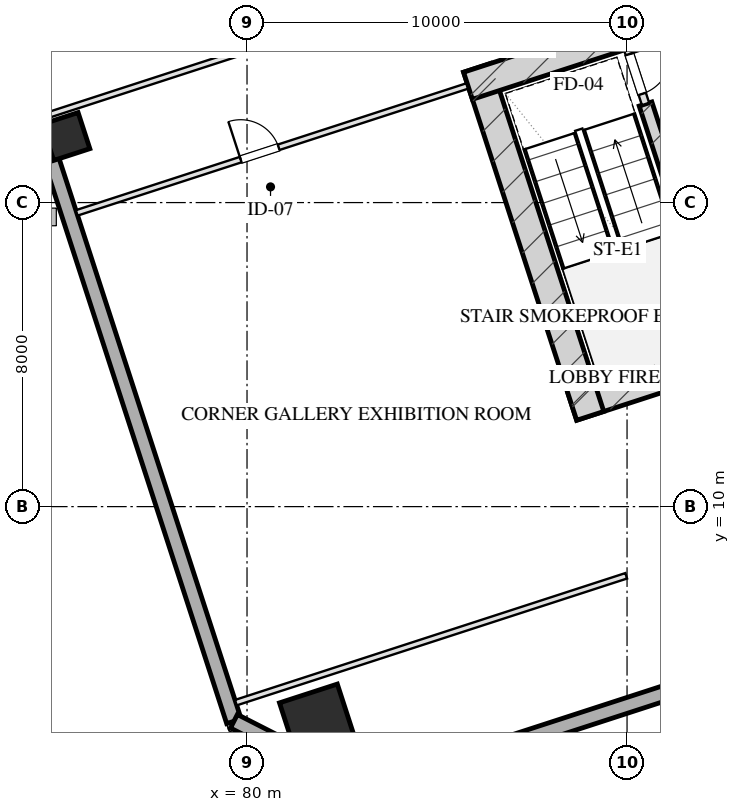
"""IFC4 building model, lengths in metres.
Left out: names, types, materials, properties, quantities, classifications, styles, units other than length and angle.
Written with IfcOpenShell. Run it as: python <this file> out.ifc"""

import sys

from ifc_helpers import new_model, si_unit, direction, frame, frame_2d, origin, origin_2d, place, context, subcontext, project, spatial, rectangle, hollow_rectangle, extrude, element, fill, save


model = new_model("IFC4")
c1 = context("Model", 3, precision=1e-05, world=origin(), true_north=direction((0.0, 1.0)))
c2 = subcontext(c1, "Body", "Model", "MODEL_VIEW")
j1 = project(units=[si_unit("LENGTHUNIT", "METRE"), si_unit("PLANEANGLEUNIT", "RADIAN")], contexts=[c1])
p1 = place(None, origin())
s1 = spatial("IfcSite", under=j1, at=p1, CompositionType="ELEMENT")
p2 = place(p1, origin())
s2 = spatial("IfcBuilding", under=s1, at=p2, CompositionType="ELEMENT")
p3 = place(p2, frame((0.0, 0.0, 34.0)))
s3 = spatial("IfcBuildingStorey", under=s2, at=p3, CompositionType="ELEMENT", Elevation=34.0)
p4 = place(p3, frame((88.559, 12.629, 0.0), z_axis=(0.0, 0.0, 1.0), x_axis=(0.951056072937, 0.309018358888, 0.0)))
e1 = element("IfcWall", 1, at=p4, inside=s3, PredefinedType="SHEAR", context=c2, shape_type="SweptSolid", body=[
    extrude(rectangle(XDim=16.55, YDim=0.75, at=frame_2d((8.275, 0.0))), origin(), (0.0, 0.0, 1.0), 4.0),
])
p5 = place(p3, frame((86.055, 21.546, 0.0), z_axis=(0.0, 0.0, 1.0), x_axis=(0.309023585745, -0.951054374604, 0.0)))
e2 = element("IfcWall", 2, at=p5, inside=s3, PredefinedType="SHEAR", context=c2, shape_type="SweptSolid", body=[
    extrude(rectangle(XDim=9.63, YDim=0.75, at=frame_2d((4.815, 0.0))), origin(), (0.0, 0.0, 1.0), 4.0),
])
p6 = place(p3, frame((90.486, 20.594, 0.0), z_axis=(0.0, 0.0, 1.0), x_axis=(0.309020428229, -0.951055400562, 0.0)))
e3 = element("IfcWall", 3, at=p6, inside=s3, PredefinedType="SHEAR", context=c2, shape_type="SweptSolid", body=[
    extrude(rectangle(XDim=6.98, YDim=0.35, at=frame_2d((3.49, 0.0))), origin(), (0.0, 0.0, 1.0), 4.0),
])
p7 = place(p3, frame((85.814, 21.074, 0.0), z_axis=(0.0, 0.0, 1.0), x_axis=(0.95106580992, 0.308988390074, 0.0)))
e4 = element("IfcWall", 4, at=p7, inside=s3, PredefinedType="SHEAR", context=c2, shape_type="SweptSolid", body=[
    extrude(rectangle(XDim=4.295, YDim=0.75, at=frame_2d((2.147, 0.0))), origin(), (0.0, 0.0, 1.0), 4.0),
])
p8 = place(p3, frame((81.863, 4.323, 0.0), z_axis=(0.0, 0.0, 1.0), x_axis=(0.951056516295, 0.309016994375, 0.0)))
e5 = element("IfcColumn", 5, at=p8, inside=s3, PredefinedType="COLUMN", context=c2, shape_type="SweptSolid", body=[
    extrude(hollow_rectangle(XDim=1.6, YDim=1.6, WallThickness=0.055, at=origin_2d()), origin(), (0.0, 0.0, 1.0), 4.001),
])
p9 = place(p3, frame((75.234, 19.739, 0.0), z_axis=(0.0, 0.0, 1.0), x_axis=(0.951056516295, 0.309016994375, 0.0)))
e6 = element("IfcColumn", 6, at=p9, inside=s3, PredefinedType="COLUMN", context=c2, shape_type="SweptSolid", body=[
    extrude(hollow_rectangle(XDim=1.0, YDim=1.0, WallThickness=0.036, at=origin_2d()), origin(), (0.0, 0.0, 1.0), 4.001),
])
p10 = place(p3, frame((79.655, 4.352, 0.0), z_axis=(0.0, 0.0, 1.0), x_axis=(-0.309014526607, 0.951057318118, 0.0)))
e7 = element("IfcWall", 7, at=p10, inside=s3, PredefinedType="SOLIDWALL", context=c2, shape_type="SweptSolid", body=[
    extrude(rectangle(XDim=50.0, YDim=0.4, at=frame_2d((25.0, 0.0))), origin(), (0.0, 0.0, 1.0), 3.16),
])
p11 = place(p10, frame((17.35, 0.0, 0.75)))
e8 = element("IfcOpeningElement", 8, at=p11, cuts=e7, PredefinedType="OPENING", context=c2, shape_type="SweptSolid", body=[
    extrude(rectangle(XDim=2.5, YDim=1.75, at=frame_2d((1.25, 0.875))), frame((0.0, 0.21, 0.0), z_axis=(0.0, -1.0, 0.0), x_axis=(1.0, 0.0, 0.0)), (0.0, 0.0, 1.0), 0.42),
])
p12 = place(p10, frame((21.15, 0.0, 0.75)))
e9 = element("IfcOpeningElement", 9, at=p12, cuts=e7, PredefinedType="OPENING", context=c2, shape_type="SweptSolid", body=[
    extrude(rectangle(XDim=2.5, YDim=1.75, at=frame_2d((1.25, 0.875))), frame((0.0, 0.21, 0.0), z_axis=(0.0, -1.0, 0.0), x_axis=(1.0, 0.0, 0.0)), (0.0, 0.0, 1.0), 0.42),
])
p13 = place(p10, frame((27.38, 0.0, 0.0)))
e10 = element("IfcOpeningElement", 10, at=p13, cuts=e7, PredefinedType="OPENING", context=c2, shape_type="SweptSolid", body=[
    extrude(rectangle(XDim=1.1, YDim=2.15, at=frame_2d((0.55, 1.075))), frame((0.0, 0.21, 0.0), z_axis=(0.0, -1.0, 0.0), x_axis=(1.0, 0.0, 0.0)), (0.0, 0.0, 1.0), 0.42),
])
p14 = place(p3, frame((113.998, 12.567, 0.0), z_axis=(0.0, 0.0, 1.0), x_axis=(-0.951055939317, -0.309018770125, 0.0)))
e11 = element("IfcWall", 11, at=p14, inside=s3, PredefinedType="SOLIDWALL", context=c2, shape_type="SweptSolid", body=[
    extrude(rectangle(XDim=32.4, YDim=0.4, at=frame_2d((16.2, 0.0))), origin(), (0.0, 0.0, 1.0), 3.16),
])
p15 = place(p3, frame((83.184, 2.554, 0.0), z_axis=(0.0, 0.0, 1.0), x_axis=(-0.890998089617, 0.454007053137, 0.0)))
e12 = element("IfcWall", 12, at=p15, inside=s3, PredefinedType="SOLIDWALL", context=c2, shape_type="SweptSolid", body=[
    extrude(rectangle(XDim=3.96, YDim=0.4, at=frame_2d((1.98, 0.0))), origin(), (0.0, 0.0, 1.0), 3.16),
])
p16 = place(p3, frame((89.899, 22.401, 0.0), z_axis=(0.0, 0.0, 1.0), x_axis=(0.308932062672, -0.951084108086, 0.0)))
e13 = element("IfcWall", 13, at=p16, inside=s3, PredefinedType="PARTITIONING", context=c2, shape_type="SweptSolid", body=[
    extrude(rectangle(XDim=1.9, YDim=0.2, at=frame_2d((0.95, 0.0))), origin(), (0.0, 0.0, 1.0), 3.725),
])
p17 = place(p16, frame((0.52, 0.0, 0.0)))
e14 = element("IfcOpeningElement", 14, at=p17, cuts=e13, PredefinedType="OPENING", context=c2, shape_type="SweptSolid", body=[
    extrude(rectangle(XDim=1.1, YDim=2.05, at=frame_2d((0.55, 1.025))), frame((0.0, 0.11, 0.0), z_axis=(0.0, -1.0, 0.0), x_axis=(1.0, 0.0, 0.0)), (0.0, 0.0, 1.0), 0.22),
])
p18 = place(p3, frame((79.707, 4.842, 0.0), z_axis=(0.0, 0.0, 1.0), x_axis=(0.951056658866, 0.309016555588, 0.0)))
e15 = element("IfcWall", 15, at=p18, inside=s3, PredefinedType="PARTITIONING", context=c2, shape_type="SweptSolid", body=[
    extrude(rectangle(XDim=10.8, YDim=0.15, at=frame_2d((5.4, 0.0))), origin(), (0.0, 0.0, 1.0), 3.725),
])
p19 = place(p3, frame((75.519, 17.729, 0.0), z_axis=(0.0, 0.0, 1.0), x_axis=(0.951056658866, 0.309016555588, 0.0)))
e16 = element("IfcWall", 16, at=p19, inside=s3, PredefinedType="PARTITIONING", context=c2, shape_type="SweptSolid", body=[
    extrude(rectangle(XDim=10.8, YDim=0.15, at=frame_2d((5.4, 0.0))), origin(), (0.0, 0.0, 1.0), 3.725),
])
p20 = place(p19, frame((4.536, 0.0, 0.0)))
e17 = element("IfcOpeningElement", 17, at=p20, cuts=e16, PredefinedType="OPENING", context=c2, shape_type="SweptSolid", body=[
    extrude(rectangle(XDim=1.05, YDim=2.05, at=frame_2d((0.525, 1.025))), frame((0.0, 0.085, 0.0), z_axis=(0.0, -1.0, 0.0), x_axis=(1.0, 0.0, 0.0)), (0.0, 0.0, 1.0), 0.17),
])
p21 = place(p3, frame((74.691, 20.278, 0.0), z_axis=(0.0, 0.0, 1.0), x_axis=(0.951052712421, 0.309028701251, 0.0)))
e18 = element("IfcWall", 18, at=p21, inside=s3, PredefinedType="PARTITIONING", context=c2, shape_type="SweptSolid", body=[
    extrude(rectangle(XDim=13.375, YDim=0.15, at=frame_2d((6.688, 0.0))), origin(), (0.0, 0.0, 1.0), 3.725),
])
p22 = place(p17, origin())
e19 = element("IfcDoor", 19, at=p22, inside=s3, OperationType="SINGLE_SWING_LEFT", PredefinedType="DOOR", context=c2, shape_type="SweptSolid", body=[
    extrude(rectangle(XDim=1.1, YDim=2.05, at=frame_2d((0.55, 1.025))), frame((0.0, 0.025, 0.0), z_axis=(0.0, -1.0, 0.0), x_axis=(1.0, 0.0, 0.0)), (0.0, 0.0, 1.0), 0.05),
])
fill(e14, e19)
p23 = place(p20, origin())
e20 = element("IfcDoor", 20, at=p23, inside=s3, OperationType="SINGLE_SWING_LEFT", PredefinedType="DOOR", context=c2, shape_type="SweptSolid", body=[
    extrude(rectangle(XDim=1.05, YDim=2.05, at=frame_2d((0.525, 1.025))), frame((0.0, 0.025, 0.0), z_axis=(0.0, -1.0, 0.0), x_axis=(1.0, 0.0, 0.0)), (0.0, 0.0, 1.0), 0.05),
])
fill(e17, e20)
save(model, sys.argv[1])
